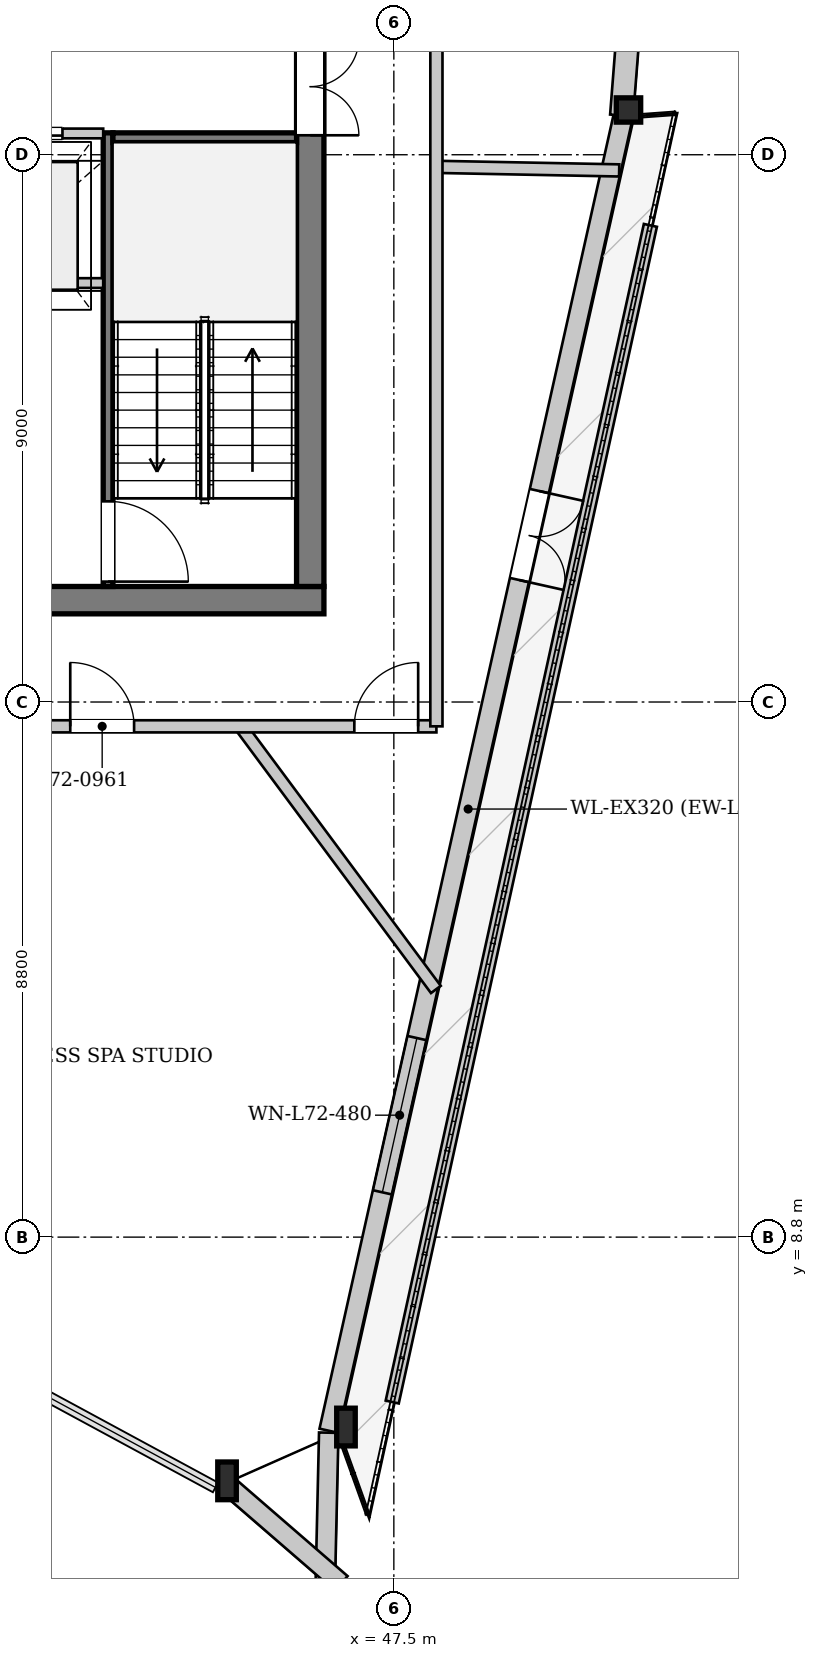
"""IFC4 building model, lengths in metres.
Left out: names, types, materials, properties, quantities, classifications, styles, units other than length and angle.
Written with IfcOpenShell. Run it as: python <this file> out.ifc"""

import sys

from ifc_helpers import new_model, si_unit, direction, frame, frame_2d, origin, origin_2d, place, context, subcontext, project, spatial, rectangle, i_section, extrude, source, transform, mapped, element, fill, save


model = new_model("IFC4")
c1 = context("Model", 3, precision=1e-05, world=origin(), true_north=direction((0.0, 1.0)))
c2 = subcontext(c1, "Body", "Model", "MODEL_VIEW")
j1 = project(units=[si_unit("LENGTHUNIT", "METRE"), si_unit("PLANEANGLEUNIT", "RADIAN")], contexts=[c1])
p1 = place(None, origin())
s1 = spatial("IfcSite", under=j1, at=p1, CompositionType="ELEMENT")
p2 = place(p1, origin())
s2 = spatial("IfcBuilding", under=s1, at=p2, CompositionType="ELEMENT")
p3 = place(p2, frame((0.0, 0.0, 270.5)))
s3 = spatial("IfcBuildingStorey", under=s2, at=p3, CompositionType="ELEMENT", Elevation=270.5)
m1 = source(origin(), c2, "Body", "SweptSolid", [
    extrude(i_section(OverallWidth=0.305, OverallDepth=0.62, WebThickness=0.021, FlangeThickness=0.04, at=origin_2d()), origin(), (0.0, 0.0, 1.0), 3.463),
])
p4 = place(p3, frame((44.567, 4.684, 0.0), z_axis=(0.109634973435, 0.062537762982, 0.992002621368), x_axis=(-0.495477069619, 0.868621018328, 0.0)))
e1 = element("IfcColumn", 1, at=p4, inside=s3, PredefinedType="COLUMN", context=c2, shape_type="MappedRepresentation", body=[
    mapped(m1, transform((0.0, 0.0, 0.0), x_axis=(1.0, 0.0, 0.0), y_axis=(0.0, 1.0, 0.0), z_axis=(0.0, 0.0, 1.0), scale=1.0)),
])
m2 = source(origin(), c2, "Body", "SweptSolid", [
    extrude(i_section(OverallWidth=0.305, OverallDepth=0.62, WebThickness=0.021, FlangeThickness=0.04, at=origin_2d()), origin(), (0.0, 0.0, 1.0), 3.449),
])
p5 = place(p3, frame((46.59, 5.58, 0.0), z_axis=(0.071346276481, 0.056057788664, 0.995875109219), x_axis=(-0.617821551932, 0.786318338822, 0.0)))
e2 = element("IfcColumn", 2, at=p5, inside=s3, PredefinedType="COLUMN", context=c2, shape_type="MappedRepresentation", body=[
    mapped(m2, transform((0.0, 0.0, 0.0), x_axis=(1.0, 0.0, 0.0), y_axis=(0.0, 1.0, 0.0), z_axis=(0.0, 0.0, 1.0), scale=1.0)),
])
m3 = source(origin(), c2, "Body", "SweptSolid", [
    extrude(i_section(OverallWidth=0.401, OverallDepth=0.399, WebThickness=0.022, FlangeThickness=0.034, at=origin_2d()), origin(), (0.0, 0.0, 1.0), 3.445),
])
p6 = place(p3, frame((51.436, 27.231, 0.0), z_axis=(-0.044436144626, 0.060878226848, 0.997155589939), x_axis=(-0.807718335097, -0.589568563569, 0.0)))
e3 = element("IfcColumn", 3, at=p6, inside=s3, PredefinedType="COLUMN", context=c2, shape_type="MappedRepresentation", body=[
    mapped(m3, transform((0.0, 0.0, 0.0), x_axis=(1.0, 0.0, 0.0), y_axis=(0.0, 1.0, 0.0), z_axis=(0.0, 0.0, 1.0), scale=1.0)),
])
p7 = place(p3, frame((51.28, 27.266, 0.0), z_axis=(0.0, 0.0, 1.0), x_axis=(-0.218426207381, -0.975853468472, 0.0)))
e4 = element("IfcWall", 4, at=p7, inside=s3, PredefinedType="SOLIDWALL", context=c2, shape_type="SweptSolid", body=[
    extrude(rectangle(XDim=22.187, YDim=0.32, at=frame_2d((11.093, 0.0))), origin(), (0.0, 0.0, 1.0), 2.872),
])
p8 = place(p7, frame((6.35, 0.0, 0.0)))
e5 = element("IfcOpeningElement", 5, at=p8, cuts=e4, PredefinedType="OPENING", context=c2, shape_type="SweptSolid", body=[
    extrude(rectangle(XDim=1.5, YDim=2.3, at=frame_2d((0.75, 1.15))), frame((0.0, 0.17, 0.0), z_axis=(0.0, -1.0, 0.0), x_axis=(1.0, 0.0, 0.0)), (0.0, 0.0, 1.0), 0.34),
])
p9 = place(p7, frame((15.568, 0.0, 0.402)))
e6 = element("IfcOpeningElement", 6, at=p9, cuts=e4, PredefinedType="OPENING", context=c2, shape_type="SweptSolid", body=[
    extrude(rectangle(XDim=2.6, YDim=2.35, at=frame_2d((1.3, 1.175))), frame((0.0, 0.17, 0.0), z_axis=(0.0, -1.0, 0.0), x_axis=(1.0, 0.0, 0.0)), (0.0, 0.0, 1.0), 0.34),
])
for number, where, z_axis, x_axis in (
    (7, (46.429, 5.584, 0.0), (0.0, 0.0, 1.0), (-0.023, -1.0, 0.0)),
    (8, (46.635, 3.104, 0.0), (0.0, 0.0, 1.0), (-0.756, 0.655, 0.0)),
):
    element("IfcWall", number, at=place(p3, frame(where, z_axis=z_axis, x_axis=x_axis)), inside=s3, PredefinedType="SOLIDWALL", context=c2, shape_type="SweptSolid", body=[
        extrude(rectangle(XDim=2.597, YDim=0.32, at=frame_2d((1.299, 0.0))), origin(), (0.0, 0.0, 1.0), 2.872),
    ])
p10 = place(p3, frame((52.981, 49.365, 0.0), z_axis=(0.0, 0.0, 1.0), x_axis=(-0.078193389746, -0.99693820962, 0.0)))
e9 = element("IfcWall", 9, at=p10, inside=s3, PredefinedType="SOLIDWALL", context=c2, shape_type="SweptSolid", body=[
    extrude(rectangle(XDim=22.187, YDim=0.38, at=frame_2d((11.093, 0.0))), origin(), (0.0, 0.0, 1.0), 2.872),
])
p11 = place(p10, frame((5.312, 0.0, 0.502)))
e10 = element("IfcOpeningElement", 10, at=p11, cuts=e9, PredefinedType="OPENING", context=c2, shape_type="SweptSolid", body=[
    extrude(rectangle(XDim=2.2, YDim=2.25, at=frame_2d((1.1, 1.125))), frame((0.0, 0.2, 0.0), z_axis=(0.0, -1.0, 0.0), x_axis=(1.0, 0.0, 0.0)), (0.0, 0.0, 1.0), 0.4),
])
p12 = place(p10, frame((14.874, 0.0, 0.502)))
e11 = element("IfcOpeningElement", 11, at=p12, cuts=e9, PredefinedType="OPENING", context=c2, shape_type="SweptSolid", body=[
    extrude(rectangle(XDim=2.2, YDim=2.25, at=frame_2d((1.1, 1.125))), frame((0.0, 0.2, 0.0), z_axis=(0.0, -1.0, 0.0), x_axis=(1.0, 0.0, 0.0)), (0.0, 0.0, 1.0), 0.4),
])
p13 = place(p3, frame((47.473, 6.088, 0.0), z_axis=(0.0, 0.0, 1.0), x_axis=(0.214309508329, 0.976765803373, 0.0)))
e12 = element("IfcWall", 12, at=p13, inside=s3, PredefinedType="PARAPET", context=c2, shape_type="SweptSolid", body=[
    extrude(rectangle(XDim=19.811, YDim=0.22, at=frame_2d((9.905, 0.0))), origin(), (0.0, 0.0, 1.0), 0.3),
])
p14 = place(p3, frame((46.35, 19.275, 0.0), z_axis=(0.0, 0.0, 1.0), x_axis=(-1.0, 0.0, 0.0)))
e13 = element("IfcWall", 13, at=p14, inside=s3, PredefinedType="SHEAR", context=c2, shape_type="SweptSolid", body=[
    extrude(rectangle(XDim=16.7, YDim=0.45, at=frame_2d((8.35, 0.0))), origin(), (0.0, 0.0, 1.0), 3.38),
])
p15 = place(p14, frame((4.55, 0.0, 0.0)))
e14 = element("IfcOpeningElement", 14, at=p15, cuts=e13, PredefinedType="OPENING", context=c2, shape_type="SweptSolid", body=[
    extrude(rectangle(XDim=1.12, YDim=2.25, at=frame_2d((0.56, 1.125))), frame((0.0, 0.235, 0.0), z_axis=(0.0, -1.0, 0.0), x_axis=(1.0, 0.0, 0.0)), (0.0, 0.0, 1.0), 0.47),
])
p16 = place(p14, frame((11.05, 0.0, 0.0)))
e15 = element("IfcOpeningElement", 15, at=p16, cuts=e13, PredefinedType="OPENING", context=c2, shape_type="SweptSolid", body=[
    extrude(rectangle(XDim=1.12, YDim=2.25, at=frame_2d((0.56, 1.125))), frame((0.0, 0.235, 0.0), z_axis=(0.0, -1.0, 0.0), x_axis=(1.0, 0.0, 0.0)), (0.0, 0.0, 1.0), 0.47),
])
p17 = place(p3, frame((46.125, 33.7, 0.0), z_axis=(0.0, 0.0, 1.0), x_axis=(0.0, -1.0, 0.0)))
e16 = element("IfcWall", 16, at=p17, inside=s3, PredefinedType="SHEAR", context=c2, shape_type="SweptSolid", body=[
    extrude(rectangle(XDim=14.2, YDim=0.45, at=frame_2d((7.1, 0.0))), origin(), (0.0, 0.0, 1.0), 3.38),
])
p18 = place(p17, frame((5.18, 0.0, 0.0)))
e17 = element("IfcOpeningElement", 17, at=p18, cuts=e16, PredefinedType="OPENING", context=c2, shape_type="SweptSolid", body=[
    extrude(rectangle(XDim=1.6, YDim=2.2, at=frame_2d((0.8, 1.1))), frame((0.0, 0.235, 0.0), z_axis=(0.0, -1.0, 0.0), x_axis=(1.0, 0.0, 0.0)), (0.0, 0.0, 1.0), 0.47),
])
p19 = place(p17, frame((2.05, 0.0, 0.0)))
e18 = element("IfcOpeningElement", 18, at=p19, cuts=e16, PredefinedType="OPENING", context=c2, shape_type="SweptSolid", body=[
    extrude(rectangle(XDim=0.95, YDim=2.1, at=frame_2d((0.475, 1.05))), frame((0.0, 0.235, 0.0), z_axis=(0.0, -1.0, 0.0), x_axis=(1.0, 0.0, 0.0)), (0.0, 0.0, 1.0), 0.47),
])
p20 = place(p3, frame((42.8, 26.96, 0.0), z_axis=(0.0, 0.0, 1.0), x_axis=(0.0, -1.0, 0.0)))
e19 = element("IfcWall", 19, at=p20, inside=s3, PredefinedType="PARTITIONING", context=c2, shape_type="SweptSolid", body=[
    extrude(rectangle(XDim=7.46, YDim=0.16, at=frame_2d((3.73, 0.0))), origin(), (0.0, 0.0, 1.0), 3.38),
])
p21 = place(p20, frame((6.06, 0.0, 0.0)))
e20 = element("IfcOpeningElement", 20, at=p21, cuts=e19, PredefinedType="OPENING", context=c2, shape_type="SweptSolid", body=[
    extrude(rectangle(XDim=1.32, YDim=2.2, at=frame_2d((0.66, 1.1))), frame((0.0, 0.09, 0.0), z_axis=(0.0, -1.0, 0.0), x_axis=(1.0, 0.0, 0.0)), (0.0, 0.0, 1.0), 0.18),
])
p22 = place(p3, frame((42.88, 26.88, 0.0), z_axis=(0.0, 0.0, 1.0), x_axis=(1.0, 0.0, 0.0)))
e21 = element("IfcWall", 21, at=p22, inside=s3, PredefinedType="PARTITIONING", context=c2, shape_type="SweptSolid", body=[
    extrude(rectangle(XDim=3.02, YDim=0.16, at=frame_2d((1.51, 0.0))), origin(), (0.0, 0.0, 1.0), 3.38),
])
p23 = place(p3, frame((33.28, 24.49, 0.0), z_axis=(0.0, 0.0, 1.0), x_axis=(1.0, 0.0, 0.0)))
e22 = element("IfcWall", 22, at=p23, inside=s3, PredefinedType="PARTITIONING", context=c2, shape_type="SweptSolid", body=[
    extrude(rectangle(XDim=9.44, YDim=0.16, at=frame_2d((4.72, 0.0))), origin(), (0.0, 0.0, 1.0), 3.38),
])
p24 = place(p3, frame((33.28, 26.95, 0.0), z_axis=(0.0, 0.0, 1.0), x_axis=(1.0, 0.0, 0.0)))
e23 = element("IfcWall", 23, at=p24, inside=s3, PredefinedType="PARTITIONING", context=c2, shape_type="SweptSolid", body=[
    extrude(rectangle(XDim=9.44, YDim=0.16, at=frame_2d((4.72, 0.0))), origin(), (0.0, 0.0, 1.0), 3.38),
])
p25 = place(p24, frame((1.2, 0.0, 0.0)))
e24 = element("IfcOpeningElement", 24, at=p25, cuts=e23, PredefinedType="OPENING", context=c2, shape_type="SweptSolid", body=[
    extrude(rectangle(XDim=0.95, YDim=2.1, at=frame_2d((0.475, 1.05))), frame((0.0, 0.09, 0.0), z_axis=(0.0, -1.0, 0.0), x_axis=(1.0, 0.0, 0.0)), (0.0, 0.0, 1.0), 0.18),
])
p26 = place(p24, frame((4.65, 0.0, 0.0)))
e25 = element("IfcOpeningElement", 25, at=p26, cuts=e23, PredefinedType="OPENING", context=c2, shape_type="SweptSolid", body=[
    extrude(rectangle(XDim=0.95, YDim=2.1, at=frame_2d((0.475, 1.05))), frame((0.0, 0.09, 0.0), z_axis=(0.0, -1.0, 0.0), x_axis=(1.0, 0.0, 0.0)), (0.0, 0.0, 1.0), 0.18),
])
p27 = place(p24, frame((7.67, 0.0, 0.0)))
e26 = element("IfcOpeningElement", 26, at=p27, cuts=e23, PredefinedType="OPENING", context=c2, shape_type="SweptSolid", body=[
    extrude(rectangle(XDim=1.1, YDim=2.2, at=frame_2d((0.55, 1.1))), frame((0.0, 0.09, 0.0), z_axis=(0.0, -1.0, 0.0), x_axis=(1.0, 0.0, 0.0)), (0.0, 0.0, 1.0), 0.18),
])
p28 = place(p3, frame((44.979, 17.2, 0.0), z_axis=(0.0, 0.0, 1.0), x_axis=(0.596107962847, -0.802904288586, 0.0)))
e27 = element("IfcWall", 27, at=p28, inside=s3, PredefinedType="PARTITIONING", context=c2, shape_type="SweptSolid", body=[
    extrude(rectangle(XDim=5.389, YDim=0.2, at=frame_2d((2.695, 0.0))), origin(), (0.0, 0.0, 1.0), 3.38),
])
p29 = place(p3, frame((48.2, 26.401, 0.0), z_axis=(0.0, 0.0, 1.0), x_axis=(0.999808476489, -0.019570650003, 0.0)))
e28 = element("IfcWall", 28, at=p29, inside=s3, PredefinedType="PARTITIONING", context=c2, shape_type="SweptSolid", body=[
    extrude(rectangle(XDim=3.006, YDim=0.2, at=frame_2d((1.503, 0.0))), origin(), (0.0, 0.0, 1.0), 3.38),
])
p30 = place(p3, frame((27.8, 17.2, 0.0), z_axis=(0.0, 0.0, 1.0), x_axis=(1.0, 0.0, 0.0)))
e29 = element("IfcWall", 29, at=p30, inside=s3, PredefinedType="PARTITIONING", context=c2, shape_type="SweptSolid", body=[
    extrude(rectangle(XDim=20.4, YDim=0.2, at=frame_2d((10.2, 0.0))), origin(), (0.0, 0.0, 1.0), 3.38),
])
p31 = place(p30, frame((14.378, 0.0, 0.0)))
e30 = element("IfcOpeningElement", 30, at=p31, cuts=e29, PredefinedType="OPENING", context=c2, shape_type="SweptSolid", body=[
    extrude(rectangle(XDim=1.05, YDim=2.2, at=frame_2d((0.525, 1.1))), frame((0.0, 0.11, 0.0), z_axis=(0.0, -1.0, 0.0), x_axis=(1.0, 0.0, 0.0)), (0.0, 0.0, 1.0), 0.22),
])
p32 = place(p30, frame((19.05, 0.0, 0.0)))
e31 = element("IfcOpeningElement", 31, at=p32, cuts=e29, PredefinedType="OPENING", context=c2, shape_type="SweptSolid", body=[
    extrude(rectangle(XDim=1.05, YDim=2.2, at=frame_2d((0.525, 1.1))), frame((0.0, 0.11, 0.0), z_axis=(0.0, -1.0, 0.0), x_axis=(1.0, 0.0, 0.0)), (0.0, 0.0, 1.0), 0.22),
])
p33 = place(p30, frame((1.241, 0.0, 0.0)))
e32 = element("IfcOpeningElement", 32, at=p33, cuts=e29, PredefinedType="OPENING", context=c2, shape_type="SweptSolid", body=[
    extrude(rectangle(XDim=1.05, YDim=2.2, at=frame_2d((0.525, 1.1))), frame((0.0, 0.11, 0.0), z_axis=(0.0, -1.0, 0.0), x_axis=(1.0, 0.0, 0.0)), (0.0, 0.0, 1.0), 0.22),
])
p34 = place(p3, frame((48.2, 17.2, 0.0), z_axis=(0.0, 0.0, 1.0), x_axis=(0.0, 1.0, 0.0)))
e33 = element("IfcWall", 33, at=p34, inside=s3, PredefinedType="PARTITIONING", context=c2, shape_type="SweptSolid", body=[
    extrude(rectangle(XDim=18.8, YDim=0.2, at=frame_2d((9.4, 0.0))), origin(), (0.0, 0.0, 1.0), 3.125),
])
m4 = source(origin(), c2, "Body", "SweptSolid", [
    extrude(rectangle(XDim=1.5, YDim=2.3, at=frame_2d((0.75, 1.15))), frame((0.0, 0.025, 0.0), z_axis=(0.0, -1.0, 0.0), x_axis=(1.0, 0.0, 0.0)), (0.0, 0.0, 1.0), 0.05),
])
p35 = place(p8, origin())
e34 = element("IfcDoor", 34, at=p35, inside=s3, OperationType="DOUBLE_DOOR_SINGLE_SWING", PredefinedType="DOOR", context=c2, shape_type="MappedRepresentation", body=[
    mapped(m4, transform((0.0, 0.0, 0.0), x_axis=(1.0, 0.0, 0.0), y_axis=(0.0, 1.0, 0.0), z_axis=(0.0, 0.0, 1.0), scale=1.0)),
])
fill(e5, e34)
m5 = source(origin(), c2, "Body", "SweptSolid", [
    extrude(rectangle(XDim=2.6, YDim=2.35, at=frame_2d((1.3, 1.175))), frame((0.0, 0.03, 0.0), z_axis=(0.0, -1.0, 0.0), x_axis=(1.0, 0.0, 0.0)), (0.0, 0.0, 1.0), 0.06),
])
p36 = place(p9, origin())
e35 = element("IfcWindow", 35, at=p36, inside=s3, PartitioningType="SINGLE_PANEL", PredefinedType="WINDOW", context=c2, shape_type="MappedRepresentation", body=[
    mapped(m5, transform((0.0, 0.0, 0.0), x_axis=(1.0, 0.0, 0.0), y_axis=(0.0, 1.0, 0.0), z_axis=(0.0, 0.0, 1.0), scale=1.0)),
])
fill(e6, e35)
m6 = source(origin(), c2, "Body", "SweptSolid", [
    extrude(rectangle(XDim=1.6, YDim=2.2, at=frame_2d((0.8, 1.1))), frame((0.0, 0.025, 0.0), z_axis=(0.0, -1.0, 0.0), x_axis=(1.0, 0.0, 0.0)), (0.0, 0.0, 1.0), 0.05),
])
p37 = place(p18, origin())
e36 = element("IfcDoor", 36, at=p37, inside=s3, OperationType="DOUBLE_DOOR_SINGLE_SWING", PredefinedType="DOOR", context=c2, shape_type="MappedRepresentation", body=[
    mapped(m6, transform((0.0, 0.0, 0.0), x_axis=(1.0, 0.0, 0.0), y_axis=(0.0, 1.0, 0.0), z_axis=(0.0, 0.0, 1.0), scale=1.0)),
])
fill(e17, e36)
m7 = source(origin(), c2, "Body", "SweptSolid", [
    extrude(rectangle(XDim=1.32, YDim=2.2, at=frame_2d((0.66, 1.1))), frame((0.0, 0.025, 0.0), z_axis=(0.0, -1.0, 0.0), x_axis=(1.0, 0.0, 0.0)), (0.0, 0.0, 1.0), 0.05),
])
p38 = place(p21, origin())
e37 = element("IfcDoor", 37, at=p38, inside=s3, OperationType="SINGLE_SWING_RIGHT", PredefinedType="DOOR", context=c2, shape_type="MappedRepresentation", body=[
    mapped(m7, transform((0.0, 0.0, 0.0), x_axis=(1.0, 0.0, 0.0), y_axis=(0.0, 1.0, 0.0), z_axis=(0.0, 0.0, 1.0), scale=1.0)),
])
fill(e20, e37)
m8 = source(origin(), c2, "Body", "SweptSolid", [
    extrude(rectangle(XDim=1.1, YDim=2.2, at=frame_2d((0.55, 1.1))), frame((0.0, 0.025, 0.0), z_axis=(0.0, -1.0, 0.0), x_axis=(1.0, 0.0, 0.0)), (0.0, 0.0, 1.0), 0.05),
])
p39 = place(p27, origin())
e38 = element("IfcDoor", 38, at=p39, inside=s3, OperationType="DOUBLE_DOOR_SLIDING", PredefinedType="DOOR", context=c2, shape_type="MappedRepresentation", body=[
    mapped(m8, transform((0.0, 0.0, 0.0), x_axis=(1.0, 0.0, 0.0), y_axis=(0.0, 1.0, 0.0), z_axis=(0.0, 0.0, 1.0), scale=1.0)),
])
fill(e26, e38)
m9 = source(origin(), c2, "Body", "SweptSolid", [
    extrude(rectangle(XDim=1.05, YDim=2.2, at=frame_2d((0.525, 1.1))), frame((0.0, 0.025, 0.0), z_axis=(0.0, -1.0, 0.0), x_axis=(1.0, 0.0, 0.0)), (0.0, 0.0, 1.0), 0.05),
])
p40 = place(p31, origin())
e39 = element("IfcDoor", 39, at=p40, inside=s3, OperationType="SINGLE_SWING_LEFT", PredefinedType="DOOR", context=c2, shape_type="MappedRepresentation", body=[
    mapped(m9, transform((0.0, 0.0, 0.0), x_axis=(1.0, 0.0, 0.0), y_axis=(0.0, 1.0, 0.0), z_axis=(0.0, 0.0, 1.0), scale=1.0)),
])
fill(e30, e39)
p41 = place(p32, origin())
e40 = element("IfcDoor", 40, at=p41, inside=s3, OperationType="SINGLE_SWING_RIGHT", PredefinedType="DOOR", context=c2, shape_type="MappedRepresentation", body=[
    mapped(m9, transform((0.0, 0.0, 0.0), x_axis=(1.0, 0.0, 0.0), y_axis=(0.0, 1.0, 0.0), z_axis=(0.0, 0.0, 1.0), scale=1.0)),
])
fill(e31, e40)
save(model, sys.argv[1])
